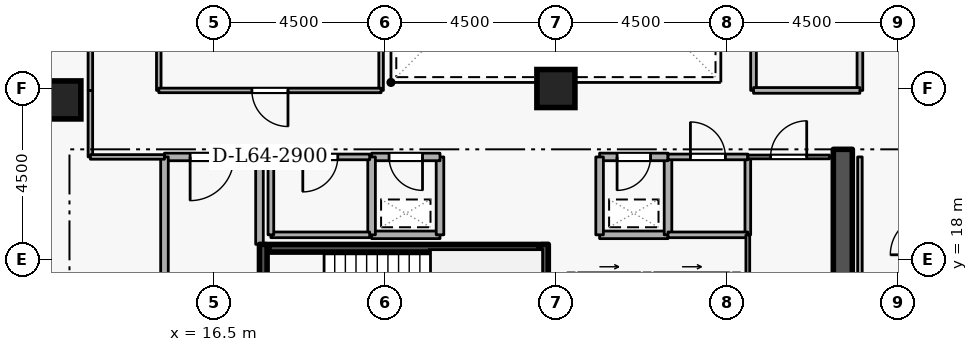
"""IFC4 building model, lengths in metres.
Left out: names, types, materials, properties, quantities, classifications, styles, units other than length and angle.
Written with IfcOpenShell. Run it as: python <this file> out.ifc"""

import sys

from ifc_helpers import new_model, si_unit, direction, frame, frame_2d, origin, origin_2d, place, context, subcontext, project, spatial, rectangle, extrude, element, fill, save


model = new_model("IFC4")
c1 = context("Model", 3, precision=1e-05, world=origin(), true_north=direction((0.0, 1.0)))
c2 = subcontext(c1, "Body", "Model", "MODEL_VIEW")
j1 = project(units=[si_unit("LENGTHUNIT", "METRE"), si_unit("PLANEANGLEUNIT", "RADIAN")], contexts=[c1])
p1 = place(None, origin())
s1 = spatial("IfcSite", under=j1, at=p1, CompositionType="ELEMENT")
p2 = place(p1, origin())
s2 = spatial("IfcBuilding", under=s1, at=p2, CompositionType="ELEMENT")
p3 = place(p2, frame((0.0, 0.0, 240.3)))
s3 = spatial("IfcBuildingStorey", under=s2, at=p3, CompositionType="ELEMENT", Elevation=240.3)
p4 = place(p3, frame((33.05, 15.1, 0.0), z_axis=(0.0, 0.0, 1.0), x_axis=(0.0, 1.0, 0.0)))
e1 = element("IfcWall", 1, at=p4, inside=s3, PredefinedType="SHEAR", context=c2, shape_type="SweptSolid", body=[
    extrude(rectangle(XDim=5.8, YDim=0.5, at=frame_2d((2.9, 0.0))), origin(), (0.0, 0.0, 1.0), 3.6),
])
for number, where, z_axis, x_axis in (
    (2, (12.5, 22.2, 0.0), (0.0, 0.0, 1.0), (1.0, 0.0, 0.0)),
    (3, (25.5, 22.5, 0.0), (0.0, 0.0, 1.0), (1.0, 0.0, 0.0)),
):
    element("IfcColumn", number, at=place(p3, frame(where, z_axis=z_axis, x_axis=x_axis)), inside=s3, PredefinedType="COLUMN", context=c2, shape_type="SweptSolid", body=[
        extrude(rectangle(XDim=1.0, YDim=1.0, at=origin_2d()), origin(), (0.0, 0.0, 1.0), 3.6),
    ])
p5 = place(p3, frame((26.08, 17.55, 0.0), z_axis=(0.0, 0.0, 1.0), x_axis=(1.0, 0.0, 0.0)))
e4 = element("IfcWall", 4, at=p5, inside=s3, PredefinedType="STANDARD", context=c2, shape_type="SweptSolid", body=[
    extrude(rectangle(XDim=1.64, YDim=0.2, at=frame_2d((0.82, 0.0))), origin(), (0.0, 0.0, 1.0), 3.34),
])
p6 = place(p5, frame((0.31, 0.0, 0.0)))
e5 = element("IfcOpeningElement", 5, at=p6, cuts=e4, PredefinedType="OPENING", context=c2, shape_type="SweptSolid", body=[
    extrude(rectangle(XDim=1.02, YDim=2.06, at=frame_2d((0.51, 1.03))), frame((0.0, 0.11, 0.0), z_axis=(0.0, -1.0, 0.0), x_axis=(1.0, 0.0, 0.0)), (0.0, 0.0, 1.0), 0.22),
])
p7 = place(p3, frame((28.08, 17.55, 0.0), z_axis=(0.0, 0.0, 1.0), x_axis=(1.0, 0.0, 0.0)))
e6 = element("IfcWall", 6, at=p7, inside=s3, PredefinedType="STANDARD", context=c2, shape_type="SweptSolid", body=[
    extrude(rectangle(XDim=1.99, YDim=0.2, at=frame_2d((0.995, 0.0))), origin(), (0.0, 0.0, 1.0), 3.34),
])
p8 = place(p7, frame((0.485, 0.0, 0.0)))
e7 = element("IfcOpeningElement", 7, at=p8, cuts=e6, PredefinedType="OPENING", context=c2, shape_type="SweptSolid", body=[
    extrude(rectangle(XDim=1.02, YDim=2.06, at=frame_2d((0.51, 1.03))), frame((0.0, 0.11, 0.0), z_axis=(0.0, -1.0, 0.0), x_axis=(1.0, 0.0, 0.0)), (0.0, 0.0, 1.0), 0.22),
])
p9 = place(p3, frame((17.8, 15.05, 0.0), z_axis=(0.0, 0.0, 1.0), x_axis=(0.0, 1.0, 0.0)))
e8 = element("IfcWall", 8, at=p9, inside=s3, PredefinedType="SHEAR", context=c2, shape_type="SweptSolid", body=[
    extrude(rectangle(XDim=3.35, YDim=0.2, at=frame_2d((1.675, 0.0))), origin(), (0.0, 0.0, 1.0), 3.6),
])
p10 = place(p9, frame((1.125, 0.0, 0.0)))
e9 = element("IfcOpeningElement", 9, at=p10, cuts=e8, PredefinedType="OPENING", context=c2, shape_type="SweptSolid", body=[
    extrude(rectangle(XDim=1.1, YDim=2.1, at=frame_2d((0.55, 1.05))), frame((0.0, 0.11, 0.0), z_axis=(0.0, -1.0, 0.0), x_axis=(1.0, 0.0, 0.0)), (0.0, 0.0, 1.0), 0.22),
])
p11 = place(p3, frame((25.2, 18.4, 0.0), z_axis=(0.0, 0.0, 1.0), x_axis=(0.0, -1.0, 0.0)))
e10 = element("IfcWall", 10, at=p11, inside=s3, PredefinedType="SHEAR", context=c2, shape_type="SweptSolid", body=[
    extrude(rectangle(XDim=3.35, YDim=0.2, at=frame_2d((1.675, 0.0))), origin(), (0.0, 0.0, 1.0), 3.6),
])
p12 = place(p3, frame((25.05, 18.297, 0.0), z_axis=(0.0, 0.0, 1.0), x_axis=(-1.0, 0.0, 0.0)))
e11 = element("IfcWall", 11, at=p12, inside=s3, PredefinedType="SHEAR", context=c2, shape_type="SweptSolid", body=[
    extrude(rectangle(XDim=7.1, YDim=0.2, at=frame_2d((3.55, 0.0))), origin(), (0.0, 0.0, 1.0), 3.6),
])
p13 = place(p3, frame((17.7, 18.4, 0.0), z_axis=(0.0, 0.0, 1.0), x_axis=(0.0, 1.0, 0.0)))
e12 = element("IfcWall", 12, at=p13, inside=s3, PredefinedType="STANDARD", context=c2, shape_type="SweptSolid", body=[
    extrude(rectangle(XDim=2.3, YDim=0.2, at=frame_2d((1.15, 0.0))), origin(), (0.0, 0.0, 1.0), 2.545),
])
p14 = place(p3, frame((17.7, 20.7, 0.0), z_axis=(0.0, 0.0, 1.0), x_axis=(-1.0, 0.0, 0.0)))
e13 = element("IfcWall", 13, at=p14, inside=s3, PredefinedType="STANDARD", context=c2, shape_type="SweptSolid", body=[
    extrude(rectangle(XDim=2.5, YDim=0.2, at=frame_2d((1.25, 0.0))), origin(), (0.0, 0.0, 1.0), 3.34),
])
p15 = place(p14, frame((0.675, 0.0, 0.0)))
e14 = element("IfcOpeningElement", 14, at=p15, cuts=e13, PredefinedType="OPENING", context=c2, shape_type="SweptSolid", body=[
    extrude(rectangle(XDim=1.15, YDim=2.1, at=frame_2d((0.575, 1.05))), frame((0.0, 0.11, 0.0), z_axis=(0.0, -1.0, 0.0), x_axis=(1.0, 0.0, 0.0)), (0.0, 0.0, 1.0), 0.22),
])
p16 = place(p3, frame((15.2, 20.7, 0.0), z_axis=(0.0, 0.0, 1.0), x_axis=(0.0, -1.0, 0.0)))
e15 = element("IfcWall", 15, at=p16, inside=s3, PredefinedType="STANDARD", context=c2, shape_type="SweptSolid", body=[
    extrude(rectangle(XDim=5.7, YDim=0.2, at=frame_2d((2.85, 0.0))), origin(), (0.0, 0.0, 1.0), 3.34),
])
p17 = place(p3, frame((26.65, 18.65, 0.0), z_axis=(0.0, 0.0, 1.0), x_axis=(1.0, 0.0, 0.0)))
e16 = element("IfcWall", 16, at=p17, inside=s3, PredefinedType="STANDARD", context=c2, shape_type="SweptSolid", body=[
    extrude(rectangle(XDim=1.8, YDim=0.2, at=frame_2d((0.9, 0.0))), origin(), (0.0, 0.0, 1.0), 3.34),
])
p18 = place(p3, frame((28.45, 18.65, 0.0), z_axis=(0.0, 0.0, 1.0), x_axis=(0.0, 1.0, 0.0)))
e17 = element("IfcWall", 17, at=p18, inside=s3, PredefinedType="STANDARD", context=c2, shape_type="SweptSolid", body=[
    extrude(rectangle(XDim=2.05, YDim=0.2, at=frame_2d((1.025, 0.0))), origin(), (0.0, 0.0, 1.0), 3.34),
])
p19 = place(p3, frame((28.45, 20.7, 0.0), z_axis=(0.0, 0.0, 1.0), x_axis=(-1.0, 0.0, 0.0)))
e18 = element("IfcWall", 18, at=p19, inside=s3, PredefinedType="STANDARD", context=c2, shape_type="SweptSolid", body=[
    extrude(rectangle(XDim=1.8, YDim=0.2, at=frame_2d((0.9, 0.0))), origin(), (0.0, 0.0, 1.0), 3.34),
])
p20 = place(p19, frame((0.46, 0.0, 0.0)))
e19 = element("IfcOpeningElement", 19, at=p20, cuts=e18, PredefinedType="OPENING", context=c2, shape_type="SweptSolid", body=[
    extrude(rectangle(XDim=0.88, YDim=2.04, at=frame_2d((0.44, 1.02))), frame((0.0, 0.11, 0.0), z_axis=(0.0, -1.0, 0.0), x_axis=(1.0, 0.0, 0.0)), (0.0, 0.0, 1.0), 0.22),
])
p21 = place(p3, frame((26.65, 20.7, 0.0), z_axis=(0.0, 0.0, 1.0), x_axis=(0.0, -1.0, 0.0)))
e20 = element("IfcWall", 20, at=p21, inside=s3, PredefinedType="STANDARD", context=c2, shape_type="SweptSolid", body=[
    extrude(rectangle(XDim=2.05, YDim=0.2, at=frame_2d((1.025, 0.0))), origin(), (0.0, 0.0, 1.0), 3.34),
])
p22 = place(p3, frame((20.65, 18.65, 0.0), z_axis=(0.0, 0.0, 1.0), x_axis=(1.0, 0.0, 0.0)))
e21 = element("IfcWall", 21, at=p22, inside=s3, PredefinedType="STANDARD", context=c2, shape_type="SweptSolid", body=[
    extrude(rectangle(XDim=1.8, YDim=0.2, at=frame_2d((0.9, 0.0))), origin(), (0.0, 0.0, 1.0), 3.34),
])
p23 = place(p3, frame((22.45, 18.65, 0.0), z_axis=(0.0, 0.0, 1.0), x_axis=(0.0, 1.0, 0.0)))
e22 = element("IfcWall", 22, at=p23, inside=s3, PredefinedType="STANDARD", context=c2, shape_type="SweptSolid", body=[
    extrude(rectangle(XDim=2.05, YDim=0.2, at=frame_2d((1.025, 0.0))), origin(), (0.0, 0.0, 1.0), 3.34),
])
p24 = place(p3, frame((22.45, 20.7, 0.0), z_axis=(0.0, 0.0, 1.0), x_axis=(-1.0, 0.0, 0.0)))
e23 = element("IfcWall", 23, at=p24, inside=s3, PredefinedType="STANDARD", context=c2, shape_type="SweptSolid", body=[
    extrude(rectangle(XDim=1.8, YDim=0.2, at=frame_2d((0.9, 0.0))), origin(), (0.0, 0.0, 1.0), 3.34),
])
p25 = place(p24, frame((0.46, 0.0, 0.0)))
e24 = element("IfcOpeningElement", 24, at=p25, cuts=e23, PredefinedType="OPENING", context=c2, shape_type="SweptSolid", body=[
    extrude(rectangle(XDim=0.88, YDim=2.04, at=frame_2d((0.44, 1.02))), frame((0.0, 0.11, 0.0), z_axis=(0.0, -1.0, 0.0), x_axis=(1.0, 0.0, 0.0)), (0.0, 0.0, 1.0), 0.22),
])
p26 = place(p3, frame((20.65, 20.7, 0.0), z_axis=(0.0, 0.0, 1.0), x_axis=(0.0, -1.0, 0.0)))
e25 = element("IfcWall", 25, at=p26, inside=s3, PredefinedType="STANDARD", context=c2, shape_type="SweptSolid", body=[
    extrude(rectangle(XDim=2.05, YDim=0.2, at=frame_2d((1.025, 0.0))), origin(), (0.0, 0.0, 1.0), 3.34),
])
p27 = place(p3, frame((18.0, 18.65, 0.0), z_axis=(0.0, 0.0, 1.0), x_axis=(1.0, 0.0, 0.0)))
e26 = element("IfcWall", 26, at=p27, inside=s3, PredefinedType="PARTITIONING", context=c2, shape_type="SweptSolid", body=[
    extrude(rectangle(XDim=2.6, YDim=0.15, at=frame_2d((1.3, 0.0))), origin(), (0.0, 0.0, 1.0), 3.34),
])
p28 = place(p3, frame((20.6, 20.7, 0.0), z_axis=(0.0, 0.0, 1.0), x_axis=(-1.0, 0.0, 0.0)))
e27 = element("IfcWall", 27, at=p28, inside=s3, PredefinedType="PARTITIONING", context=c2, shape_type="SweptSolid", body=[
    extrude(rectangle(XDim=2.6, YDim=0.15, at=frame_2d((1.3, 0.0))), origin(), (0.0, 0.0, 1.0), 3.34),
])
p29 = place(p28, frame((0.84, 0.0, 0.0)))
e28 = element("IfcOpeningElement", 28, at=p29, cuts=e27, PredefinedType="OPENING", context=c2, shape_type="SweptSolid", body=[
    extrude(rectangle(XDim=0.92, YDim=2.08, at=frame_2d((0.46, 1.04))), frame((0.0, 0.085, 0.0), z_axis=(0.0, -1.0, 0.0), x_axis=(1.0, 0.0, 0.0)), (0.0, 0.0, 1.0), 0.17),
])
p30 = place(p3, frame((18.0, 20.7, 0.0), z_axis=(0.0, 0.0, 1.0), x_axis=(0.0, -1.0, 0.0)))
e29 = element("IfcWall", 29, at=p30, inside=s3, PredefinedType="PARTITIONING", context=c2, shape_type="SweptSolid", body=[
    extrude(rectangle(XDim=2.05, YDim=0.15, at=frame_2d((1.025, 0.0))), origin(), (0.0, 0.0, 1.0), 2.545),
])
p31 = place(p3, frame((30.55, 20.7, 0.0), z_axis=(0.0, 0.0, 1.0), x_axis=(0.0, -1.0, 0.0)))
e30 = element("IfcWall", 30, at=p31, inside=s3, PredefinedType="PARTITIONING", context=c2, shape_type="SweptSolid", body=[
    extrude(rectangle(XDim=2.05, YDim=0.15, at=frame_2d((1.025, 0.0))), origin(), (0.0, 0.0, 1.0), 3.34),
])
p32 = place(p3, frame((30.55, 18.65, 0.0), z_axis=(0.0, 0.0, 1.0), x_axis=(-1.0, 0.0, 0.0)))
e31 = element("IfcWall", 31, at=p32, inside=s3, PredefinedType="PARTITIONING", context=c2, shape_type="SweptSolid", body=[
    extrude(rectangle(XDim=2.1, YDim=0.15, at=frame_2d((1.05, 0.0))), origin(), (0.0, 0.0, 1.0), 3.34),
])
p33 = place(p3, frame((28.45, 20.7, 0.0), z_axis=(0.0, 0.0, 1.0), x_axis=(1.0, 0.0, 0.0)))
e32 = element("IfcWall", 32, at=p33, inside=s3, PredefinedType="PARTITIONING", context=c2, shape_type="SweptSolid", body=[
    extrude(rectangle(XDim=2.1, YDim=0.15, at=frame_2d((1.05, 0.0))), origin(), (0.0, 0.0, 1.0), 3.34),
])
p34 = place(p33, frame((0.59, 0.0, 0.0)))
e33 = element("IfcOpeningElement", 33, at=p34, cuts=e32, PredefinedType="OPENING", context=c2, shape_type="SweptSolid", body=[
    extrude(rectangle(XDim=0.92, YDim=2.08, at=frame_2d((0.46, 1.04))), frame((0.0, 0.085, 0.0), z_axis=(0.0, -1.0, 0.0), x_axis=(1.0, 0.0, 0.0)), (0.0, 0.0, 1.0), 0.17),
])
p35 = place(p3, frame((30.55, 15.1, 0.0), z_axis=(0.0, 0.0, 1.0), x_axis=(0.0, 1.0, 0.0)))
e34 = element("IfcWall", 34, at=p35, inside=s3, PredefinedType="PARTITIONING", context=c2, shape_type="SweptSolid", body=[
    extrude(rectangle(XDim=3.55, YDim=0.1, at=frame_2d((1.775, 0.0))), origin(), (0.0, 0.0, 1.0), 3.34),
])
p36 = place(p3, frame((30.55, 20.7, 0.0), z_axis=(0.0, 0.0, 1.0), x_axis=(1.0, 0.0, 0.0)))
e35 = element("IfcWall", 35, at=p36, inside=s3, PredefinedType="PARTITIONING", context=c2, shape_type="SweptSolid", body=[
    extrude(rectangle(XDim=2.15, YDim=0.1, at=frame_2d((1.075, 0.0))), origin(), (0.0, 0.0, 1.0), 3.34),
])
p37 = place(p36, frame((0.6, 0.0, 0.0)))
e36 = element("IfcOpeningElement", 36, at=p37, cuts=e35, PredefinedType="OPENING", context=c2, shape_type="SweptSolid", body=[
    extrude(rectangle(XDim=0.95, YDim=2.1, at=frame_2d((0.475, 1.05))), frame((0.0, 0.06, 0.0), z_axis=(0.0, -1.0, 0.0), x_axis=(1.0, 0.0, 0.0)), (0.0, 0.0, 1.0), 0.12),
])
p38 = place(p3, frame((33.5, 20.7, 0.0), z_axis=(0.0, 0.0, 1.0), x_axis=(0.0, -1.0, 0.0)))
e37 = element("IfcWall", 37, at=p38, inside=s3, PredefinedType="PARTITIONING", context=c2, shape_type="SweptSolid", body=[
    extrude(rectangle(XDim=5.9, YDim=0.12, at=frame_2d((2.95, 0.0))), origin(), (0.0, 0.0, 1.0), 3.34),
])
p39 = place(p3, frame((13.25, 22.45, 0.0), z_axis=(0.0, 0.0, 1.0), x_axis=(0.0, -1.0, 0.0)))
e38 = element("IfcWall", 38, at=p39, inside=s3, PredefinedType="PARTITIONING", context=c2, shape_type="SweptSolid", body=[
    extrude(rectangle(XDim=1.75, YDim=0.12, at=frame_2d((0.875, 0.0))), origin(), (0.0, 0.0, 1.0), 3.34),
])
p40 = place(p3, frame((13.25, 20.7, 0.0), z_axis=(0.0, 0.0, 1.0), x_axis=(1.0, 0.0, 0.0)))
e39 = element("IfcWall", 39, at=p40, inside=s3, PredefinedType="PARTITIONING", context=c2, shape_type="SweptSolid", body=[
    extrude(rectangle(XDim=1.95, YDim=0.12, at=frame_2d((0.975, 0.0))), origin(), (0.0, 0.0, 1.0), 3.34),
])
p41 = place(p3, frame((13.25, 28.2, 0.0), z_axis=(0.0, 0.0, 1.0), x_axis=(0.0, -1.0, 0.0)))
e40 = element("IfcWall", 40, at=p41, inside=s3, PredefinedType="PARTITIONING", context=c2, shape_type="SweptSolid", body=[
    extrude(rectangle(XDim=5.75, YDim=0.12, at=frame_2d((2.875, 0.0))), origin(), (0.0, 0.0, 1.0), 3.34),
])
p42 = place(p41, frame((2.35, 0.0, 0.0)))
e41 = element("IfcOpeningElement", 41, at=p42, cuts=e40, PredefinedType="OPENING", context=c2, shape_type="SweptSolid", body=[
    extrude(rectangle(XDim=1.05, YDim=2.1, at=frame_2d((0.525, 1.05))), frame((0.0, 0.07, 0.0), z_axis=(0.0, -1.0, 0.0), x_axis=(1.0, 0.0, 0.0)), (0.0, 0.0, 1.0), 0.14),
])
for number, where, z_axis, x_axis in (
    (42, (15.05, 22.45, 0.0), (0.0, 0.0, 1.0), (0.0, 1.0, 0.0)),
    (43, (20.9, 28.2, 0.0), (0.0, 0.0, 1.0), (0.0, -1.0, 0.0)),
):
    element("IfcWall", number, at=place(p3, frame(where, z_axis=z_axis, x_axis=x_axis)), inside=s3, PredefinedType="PARTITIONING", context=c2, shape_type="SweptSolid", body=[
        extrude(rectangle(XDim=5.75, YDim=0.12, at=frame_2d((2.875, 0.0))), origin(), (0.0, 0.0, 1.0), 3.34),
    ])
p43 = place(p3, frame((20.9, 22.45, 0.0), z_axis=(0.0, 0.0, 1.0), x_axis=(-1.0, 0.0, 0.0)))
e44 = element("IfcWall", 44, at=p43, inside=s3, PredefinedType="PARTITIONING", context=c2, shape_type="SweptSolid", body=[
    extrude(rectangle(XDim=5.85, YDim=0.12, at=frame_2d((2.925, 0.0))), origin(), (0.0, 0.0, 1.0), 3.34),
])
p44 = place(p43, frame((2.45, 0.0, 0.0)))
e45 = element("IfcOpeningElement", 45, at=p44, cuts=e44, PredefinedType="OPENING", context=c2, shape_type="SweptSolid", body=[
    extrude(rectangle(XDim=0.95, YDim=2.1, at=frame_2d((0.475, 1.05))), frame((0.0, 0.07, 0.0), z_axis=(0.0, -1.0, 0.0), x_axis=(1.0, 0.0, 0.0)), (0.0, 0.0, 1.0), 0.14),
])
p45 = place(p3, frame((30.7, 22.45, 0.0), z_axis=(0.0, 0.0, 1.0), x_axis=(0.0, 1.0, 0.0)))
e46 = element("IfcWall", 46, at=p45, inside=s3, PredefinedType="PARTITIONING", context=c2, shape_type="SweptSolid", body=[
    extrude(rectangle(XDim=4.55, YDim=0.15, at=frame_2d((2.275, 0.0))), origin(), (0.0, 0.0, 1.0), 3.34),
])
p46 = place(p3, frame((33.5, 27.0, 0.0), z_axis=(0.0, 0.0, 1.0), x_axis=(0.0, -1.0, 0.0)))
e47 = element("IfcWall", 47, at=p46, inside=s3, PredefinedType="PARTITIONING", context=c2, shape_type="SweptSolid", body=[
    extrude(rectangle(XDim=4.55, YDim=0.15, at=frame_2d((2.275, 0.0))), origin(), (0.0, 0.0, 1.0), 3.34),
])
p47 = place(p46, frame((1.625, 0.0, 0.0)))
e48 = element("IfcOpeningElement", 48, at=p47, cuts=e47, PredefinedType="OPENING", context=c2, shape_type="SweptSolid", body=[
    extrude(rectangle(XDim=1.3, YDim=2.12, at=frame_2d((0.65, 1.06))), frame((0.0, 0.085, 0.0), z_axis=(0.0, -1.0, 0.0), x_axis=(1.0, 0.0, 0.0)), (0.0, 0.0, 1.0), 0.17),
])
p48 = place(p3, frame((33.5, 22.45, 0.0), z_axis=(0.0, 0.0, 1.0), x_axis=(-1.0, 0.0, 0.0)))
e49 = element("IfcWall", 49, at=p48, inside=s3, PredefinedType="PARTITIONING", context=c2, shape_type="SweptSolid", body=[
    extrude(rectangle(XDim=2.8, YDim=0.15, at=frame_2d((1.4, 0.0))), origin(), (0.0, 0.0, 1.0), 3.34),
])
p49 = place(p15, origin())
e50 = element("IfcDoor", 50, at=p49, inside=s3, OperationType="SINGLE_SWING_RIGHT", PredefinedType="DOOR", context=c2, shape_type="SweptSolid", body=[
    extrude(rectangle(XDim=1.15, YDim=2.1, at=frame_2d((0.575, 1.05))), frame((0.0, 0.025, 0.0), z_axis=(0.0, -1.0, 0.0), x_axis=(1.0, 0.0, 0.0)), (0.0, 0.0, 1.0), 0.05),
])
fill(e14, e50)
p50 = place(p20, origin())
e51 = element("IfcDoor", 51, at=p50, inside=s3, OperationType="SINGLE_SWING_RIGHT", PredefinedType="DOOR", context=c2, shape_type="SweptSolid", body=[
    extrude(rectangle(XDim=0.88, YDim=2.04, at=frame_2d((0.44, 1.02))), frame((0.0, 0.025, 0.0), z_axis=(0.0, -1.0, 0.0), x_axis=(1.0, 0.0, 0.0)), (0.0, 0.0, 1.0), 0.05),
])
fill(e19, e51)
p51 = place(p25, origin())
e52 = element("IfcDoor", 52, at=p51, inside=s3, OperationType="SINGLE_SWING_LEFT", PredefinedType="DOOR", context=c2, shape_type="SweptSolid", body=[
    extrude(rectangle(XDim=0.88, YDim=2.04, at=frame_2d((0.44, 1.02))), frame((0.0, 0.025, 0.0), z_axis=(0.0, -1.0, 0.0), x_axis=(1.0, 0.0, 0.0)), (0.0, 0.0, 1.0), 0.05),
])
fill(e24, e52)
p52 = place(p29, origin())
e53 = element("IfcDoor", 53, at=p52, inside=s3, OperationType="SINGLE_SWING_RIGHT", PredefinedType="DOOR", context=c2, shape_type="SweptSolid", body=[
    extrude(rectangle(XDim=0.92, YDim=2.08, at=frame_2d((0.46, 1.04))), frame((0.0, 0.025, 0.0), z_axis=(0.0, -1.0, 0.0), x_axis=(1.0, 0.0, 0.0)), (0.0, 0.0, 1.0), 0.05),
])
fill(e28, e53)
p53 = place(p34, origin())
e54 = element("IfcDoor", 54, at=p53, inside=s3, OperationType="SINGLE_SWING_LEFT", PredefinedType="DOOR", context=c2, shape_type="SweptSolid", body=[
    extrude(rectangle(XDim=0.92, YDim=2.08, at=frame_2d((0.46, 1.04))), frame((0.0, 0.025, 0.0), z_axis=(0.0, -1.0, 0.0), x_axis=(1.0, 0.0, 0.0)), (0.0, 0.0, 1.0), 0.05),
])
fill(e33, e54)
p54 = place(p37, origin())
e55 = element("IfcDoor", 55, at=p54, inside=s3, OperationType="SINGLE_SWING_RIGHT", PredefinedType="DOOR", context=c2, shape_type="SweptSolid", body=[
    extrude(rectangle(XDim=0.95, YDim=2.1, at=frame_2d((0.475, 1.05))), frame((0.0, 0.025, 0.0), z_axis=(0.0, -1.0, 0.0), x_axis=(1.0, 0.0, 0.0)), (0.0, 0.0, 1.0), 0.05),
])
fill(e36, e55)
p55 = place(p44, origin())
e56 = element("IfcDoor", 56, at=p55, inside=s3, OperationType="SINGLE_SWING_LEFT", PredefinedType="DOOR", context=c2, shape_type="SweptSolid", body=[
    extrude(rectangle(XDim=0.95, YDim=2.1, at=frame_2d((0.475, 1.05))), frame((0.0, 0.025, 0.0), z_axis=(0.0, -1.0, 0.0), x_axis=(1.0, 0.0, 0.0)), (0.0, 0.0, 1.0), 0.05),
])
fill(e45, e56)
save(model, sys.argv[1])
